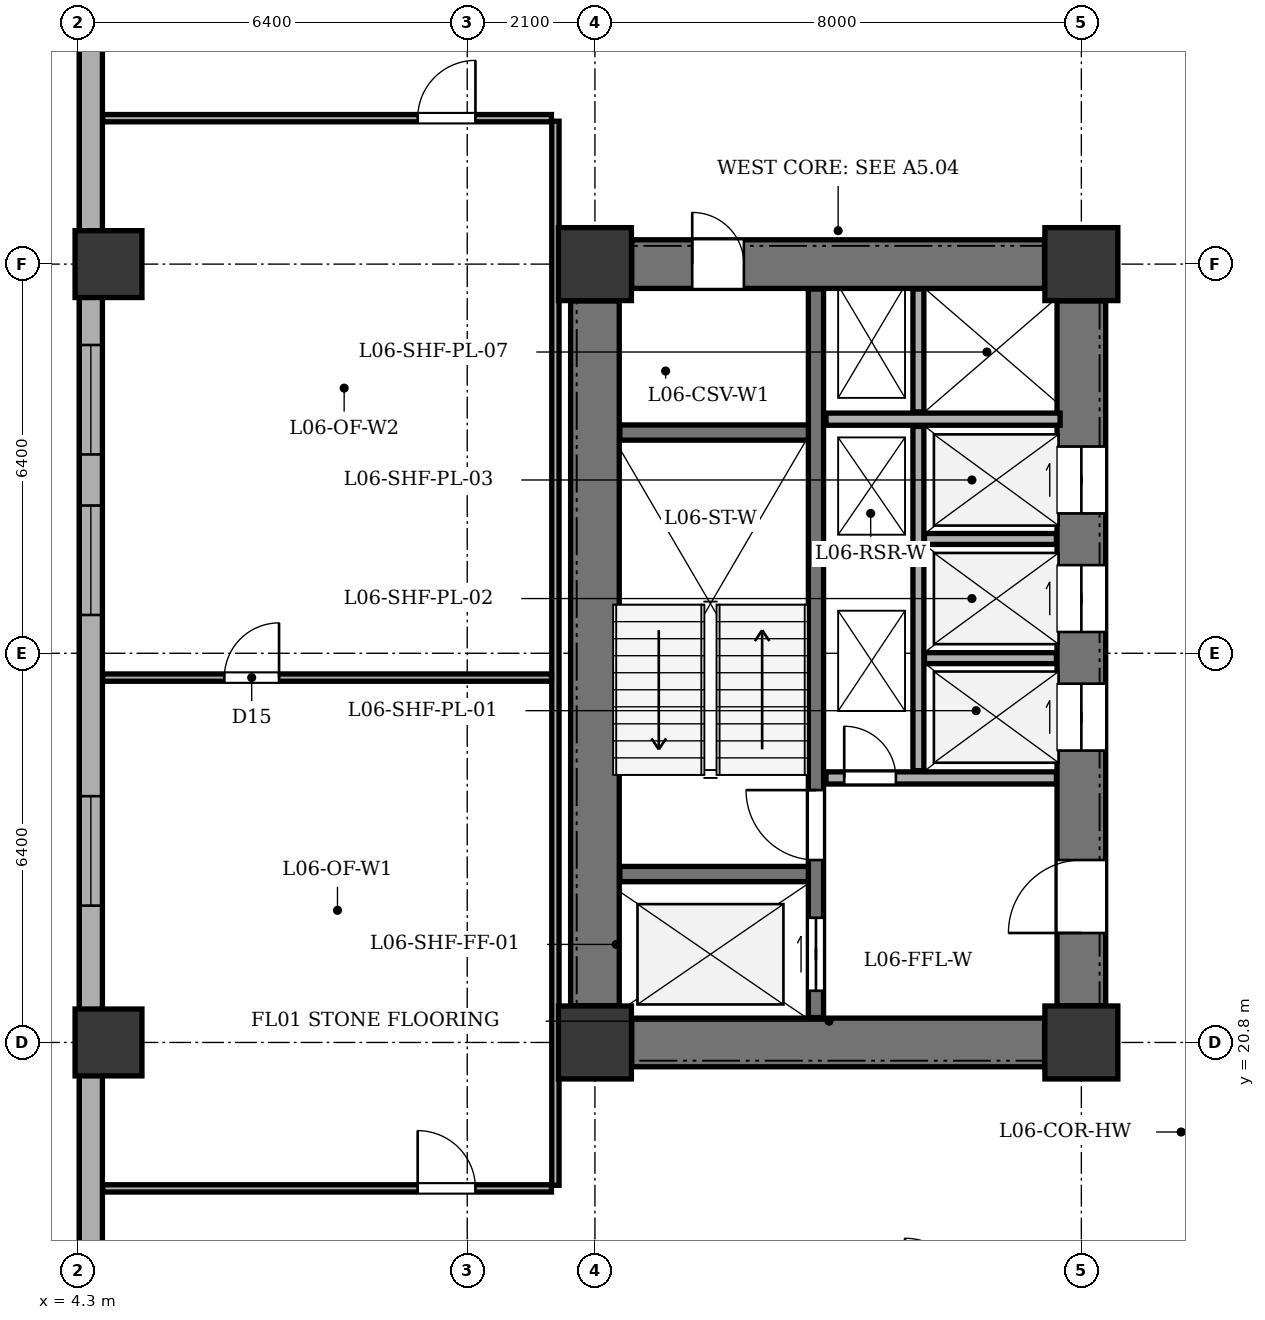
"""IFC4 building model, lengths in metres.
Left out: names, types, materials, properties, quantities, classifications, styles, units other than length and angle.
Written with IfcOpenShell. Run it as: python <this file> out.ifc"""

import sys

from ifc_helpers import new_model, si_unit, direction, frame, frame_2d, origin, origin_2d, place, context, subcontext, project, spatial, rectangle, extrude, element, fill, save


model = new_model("IFC4")
c1 = context("Model", 3, precision=1e-05, world=origin(), true_north=direction((0.0, 1.0)))
c2 = subcontext(c1, "Body", "Model", "MODEL_VIEW")
j1 = project(units=[si_unit("LENGTHUNIT", "METRE"), si_unit("PLANEANGLEUNIT", "RADIAN")], contexts=[c1])
p1 = place(None, origin())
s1 = spatial("IfcSite", under=j1, at=p1, CompositionType="ELEMENT")
p2 = place(p1, origin())
s2 = spatial("IfcBuilding", under=s1, at=p2, CompositionType="ELEMENT")
p3 = place(p2, frame((0.0, 0.0, 28.2)))
s3 = spatial("IfcBuildingStorey", under=s2, at=p3, CompositionType="ELEMENT", Elevation=28.2)
for number, where, z_axis, x_axis in (
    (1, (12.8, 20.8, 0.0), (0.0, 0.0, 1.0), (1.0, 0.0, 0.0)),
    (2, (20.8, 20.8, 0.0), (0.0, 0.0, 1.0), (1.0, 0.0, 0.0)),
    (3, (12.8, 33.6, 0.0), (0.0, 0.0, 1.0), (1.0, 0.0, 0.0)),
    (4, (20.8, 33.6, 0.0), (0.0, 0.0, 1.0), (1.0, 0.0, 0.0)),
):
    element("IfcColumn", number, at=place(p3, frame(where, z_axis=z_axis, x_axis=x_axis)), inside=s3, PredefinedType="COLUMN", context=c2, shape_type="SweptSolid", body=[
        extrude(rectangle(XDim=1.2, YDim=1.2, at=origin_2d()), origin(), (0.0, 0.0, 1.0), 3.9),
    ])
for number, where, z_axis, x_axis in (
    (5, (4.8, 20.8, 0.0), (0.0, 0.0, 1.0), (1.0, 0.0, 0.0)),
    (6, (4.8, 33.6, 0.0), (0.0, 0.0, 1.0), (1.0, 0.0, 0.0)),
):
    element("IfcColumn", number, at=place(p3, frame(where, z_axis=z_axis, x_axis=x_axis)), inside=s3, PredefinedType="COLUMN", context=c2, shape_type="SweptSolid", body=[
        extrude(rectangle(XDim=1.1, YDim=1.1, at=origin_2d()), origin(), (0.0, 0.0, 1.0), 3.9),
    ])
p4 = place(p3, frame((4.51, 6.5, 0.0), z_axis=(0.0, 0.0, 1.0), x_axis=(0.0, 1.0, 0.0)))
e7 = element("IfcWall", 7, at=p4, inside=s3, PredefinedType="STANDARD", context=c2, shape_type="SweptSolid", body=[
    extrude(rectangle(XDim=35.0, YDim=0.38, at=frame_2d((17.5, 0.0))), origin(), (0.0, 0.0, 1.0), 3.135),
])
p5 = place(p4, frame((2.693, 0.0, 0.8)))
e8 = element("IfcOpeningElement", 8, at=p5, cuts=e7, PredefinedType="OPENING", context=c2, shape_type="SweptSolid", body=[
    extrude(rectangle(XDim=1.8, YDim=1.9, at=frame_2d((0.9, 0.95))), frame((0.0, 0.2, 0.0), z_axis=(0.0, -1.0, 0.0), x_axis=(1.0, 0.0, 0.0)), (0.0, 0.0, 1.0), 0.4),
])
p6 = place(p4, frame((7.457, 0.0, 0.8)))
e9 = element("IfcOpeningElement", 9, at=p6, cuts=e7, PredefinedType="OPENING", context=c2, shape_type="SweptSolid", body=[
    extrude(rectangle(XDim=2.4, YDim=1.9, at=frame_2d((1.2, 0.95))), frame((0.0, 0.2, 0.0), z_axis=(0.0, -1.0, 0.0), x_axis=(1.0, 0.0, 0.0)), (0.0, 0.0, 1.0), 0.4),
])
p7 = place(p4, frame((16.55, 0.0, 0.8)))
e10 = element("IfcOpeningElement", 10, at=p7, cuts=e7, PredefinedType="OPENING", context=c2, shape_type="SweptSolid", body=[
    extrude(rectangle(XDim=1.8, YDim=1.9, at=frame_2d((0.9, 0.95))), frame((0.0, 0.2, 0.0), z_axis=(0.0, -1.0, 0.0), x_axis=(1.0, 0.0, 0.0)), (0.0, 0.0, 1.0), 0.4),
])
p8 = place(p4, frame((21.33, 0.0, 0.8)))
e11 = element("IfcOpeningElement", 11, at=p8, cuts=e7, PredefinedType="OPENING", context=c2, shape_type="SweptSolid", body=[
    extrude(rectangle(XDim=1.8, YDim=1.9, at=frame_2d((0.9, 0.95))), frame((0.0, 0.2, 0.0), z_axis=(0.0, -1.0, 0.0), x_axis=(1.0, 0.0, 0.0)), (0.0, 0.0, 1.0), 0.4),
])
p9 = place(p4, frame((23.97, 0.0, 0.8)))
e12 = element("IfcOpeningElement", 12, at=p9, cuts=e7, PredefinedType="OPENING", context=c2, shape_type="SweptSolid", body=[
    extrude(rectangle(XDim=1.8, YDim=1.9, at=frame_2d((0.9, 0.95))), frame((0.0, 0.2, 0.0), z_axis=(0.0, -1.0, 0.0), x_axis=(1.0, 0.0, 0.0)), (0.0, 0.0, 1.0), 0.4),
])
p10 = place(p4, frame((31.175, 0.0, 0.8)))
e13 = element("IfcOpeningElement", 13, at=p10, cuts=e7, PredefinedType="OPENING", context=c2, shape_type="SweptSolid", body=[
    extrude(rectangle(XDim=1.8, YDim=1.9, at=frame_2d((0.9, 0.95))), frame((0.0, 0.2, 0.0), z_axis=(0.0, -1.0, 0.0), x_axis=(1.0, 0.0, 0.0)), (0.0, 0.0, 1.0), 0.4),
])
p11 = place(p3, frame((12.8, 21.405, 0.0), z_axis=(0.0, 0.0, 1.0), x_axis=(0.0, 1.0, 0.0)))
e14 = element("IfcWall", 14, at=p11, inside=s3, PredefinedType="SHEAR", context=c2, shape_type="SweptSolid", body=[
    extrude(rectangle(XDim=11.59, YDim=0.8, at=frame_2d((5.795, 0.0))), origin(), (0.0, 0.0, 1.0), 3.6),
])
p12 = place(p3, frame((13.405, 20.8, 0.0), z_axis=(0.0, 0.0, 1.0), x_axis=(1.0, 0.0, 0.0)))
e15 = element("IfcWall", 15, at=p12, inside=s3, PredefinedType="SHEAR", context=c2, shape_type="SweptSolid", body=[
    extrude(rectangle(XDim=6.79, YDim=0.8, at=frame_2d((3.395, 0.0))), origin(), (0.0, 0.0, 1.0), 3.6),
])
p13 = place(p3, frame((13.405, 33.6, 0.0), z_axis=(0.0, 0.0, 1.0), x_axis=(1.0, 0.0, 0.0)))
e16 = element("IfcWall", 16, at=p13, inside=s3, PredefinedType="SHEAR", context=c2, shape_type="SweptSolid", body=[
    extrude(rectangle(XDim=6.79, YDim=0.8, at=frame_2d((3.395, 0.0))), origin(), (0.0, 0.0, 1.0), 3.6),
])
p14 = place(p13, frame((0.995, 0.0, 0.0)))
e17 = element("IfcOpeningElement", 17, at=p14, cuts=e16, PredefinedType="OPENING", context=c2, shape_type="SweptSolid", body=[
    extrude(rectangle(XDim=0.85, YDim=2.02, at=frame_2d((0.425, 1.01))), frame((0.0, 0.41, 0.0), z_axis=(0.0, -1.0, 0.0), x_axis=(1.0, 0.0, 0.0)), (0.0, 0.0, 1.0), 0.82),
])
p15 = place(p3, frame((20.8, 21.405, 0.0), z_axis=(0.0, 0.0, 1.0), x_axis=(0.0, 1.0, 0.0)))
e18 = element("IfcWall", 18, at=p15, inside=s3, PredefinedType="SHEAR", context=c2, shape_type="SweptSolid", body=[
    extrude(rectangle(XDim=11.59, YDim=0.8, at=frame_2d((5.795, 0.0))), origin(), (0.0, 0.0, 1.0), 3.6),
])
p16 = place(p15, frame((1.195, 0.0, 0.0)))
e19 = element("IfcOpeningElement", 19, at=p16, cuts=e18, PredefinedType="OPENING", context=c2, shape_type="SweptSolid", body=[
    extrude(rectangle(XDim=1.2, YDim=2.15, at=frame_2d((0.6, 1.075))), frame((0.0, 0.41, 0.0), z_axis=(0.0, -1.0, 0.0), x_axis=(1.0, 0.0, 0.0)), (0.0, 0.0, 1.0), 0.82),
])
p17 = place(p15, frame((4.195, 0.0, 0.0)))
e20 = element("IfcOpeningElement", 20, at=p17, cuts=e18, PredefinedType="OPENING", context=c2, shape_type="SweptSolid", body=[
    extrude(rectangle(XDim=1.1, YDim=2.1, at=frame_2d((0.55, 1.05))), frame((0.0, 0.41, 0.0), z_axis=(0.0, -1.0, 0.0), x_axis=(1.0, 0.0, 0.0)), (0.0, 0.0, 1.0), 0.82),
])
p18 = place(p15, frame((6.145, 0.0, 0.0)))
e21 = element("IfcOpeningElement", 21, at=p18, cuts=e18, PredefinedType="OPENING", context=c2, shape_type="SweptSolid", body=[
    extrude(rectangle(XDim=1.1, YDim=2.1, at=frame_2d((0.55, 1.05))), frame((0.0, 0.41, 0.0), z_axis=(0.0, -1.0, 0.0), x_axis=(1.0, 0.0, 0.0)), (0.0, 0.0, 1.0), 0.82),
])
p19 = place(p15, frame((8.095, 0.0, 0.0)))
e22 = element("IfcOpeningElement", 22, at=p19, cuts=e18, PredefinedType="OPENING", context=c2, shape_type="SweptSolid", body=[
    extrude(rectangle(XDim=1.1, YDim=2.1, at=frame_2d((0.55, 1.05))), frame((0.0, 0.41, 0.0), z_axis=(0.0, -1.0, 0.0), x_axis=(1.0, 0.0, 0.0)), (0.0, 0.0, 1.0), 0.82),
])
p20 = place(p3, frame((16.435, 21.21, 0.0), z_axis=(0.0, 0.0, 1.0), x_axis=(0.0, 1.0, 0.0)))
e23 = element("IfcWall", 23, at=p20, inside=s3, PredefinedType="SHEAR", context=c2, shape_type="SweptSolid", body=[
    extrude(rectangle(XDim=11.98, YDim=0.25, at=frame_2d((5.99, 0.0))), origin(), (0.0, 0.0, 1.0), 3.6),
])
p21 = place(p20, frame((0.44, 0.0, 0.0)))
e24 = element("IfcOpeningElement", 24, at=p21, cuts=e23, PredefinedType="OPENING", context=c2, shape_type="SweptSolid", body=[
    extrude(rectangle(XDim=1.2, YDim=2.15, at=frame_2d((0.6, 1.075))), frame((0.0, 0.135, 0.0), z_axis=(0.0, -1.0, 0.0), x_axis=(1.0, 0.0, 0.0)), (0.0, 0.0, 1.0), 0.27),
])
p22 = place(p20, frame((2.59, 0.0, 0.0)))
e25 = element("IfcOpeningElement", 25, at=p22, cuts=e23, PredefinedType="OPENING", context=c2, shape_type="SweptSolid", body=[
    extrude(rectangle(XDim=1.15, YDim=2.15, at=frame_2d((0.575, 1.075))), frame((0.0, 0.135, 0.0), z_axis=(0.0, -1.0, 0.0), x_axis=(1.0, 0.0, 0.0)), (0.0, 0.0, 1.0), 0.27),
])
for number, where, z_axis, x_axis in (
    (26, (13.21, 23.57, 0.0), (0.0, 0.0, 1.0), (1.0, 0.0, 0.0)),
    (27, (13.21, 30.83, 0.0), (0.0, 0.0, 1.0), (1.0, 0.0, 0.0)),
):
    element("IfcWall", number, at=place(p3, frame(where, z_axis=z_axis, x_axis=x_axis)), inside=s3, PredefinedType="SHEAR", context=c2, shape_type="SweptSolid", body=[
        extrude(rectangle(XDim=3.1, YDim=0.25, at=frame_2d((1.55, 0.0))), origin(), (0.0, 0.0, 1.0), 3.6),
    ])
p23 = place(p3, frame((16.6, 25.15, 0.0), z_axis=(0.0, 0.0, 1.0), x_axis=(1.0, 0.0, 0.0)))
e28 = element("IfcWall", 28, at=p23, inside=s3, PredefinedType="SOLIDWALL", context=c2, shape_type="SweptSolid", body=[
    extrude(rectangle(XDim=3.79, YDim=0.2, at=frame_2d((1.895, 0.0))), origin(), (0.0, 0.0, 1.0), 3.6),
])
p24 = place(p23, frame((0.3, 0.0, 0.0)))
e29 = element("IfcOpeningElement", 29, at=p24, cuts=e28, PredefinedType="OPENING", context=c2, shape_type="SweptSolid", body=[
    extrude(rectangle(XDim=0.85, YDim=2.02, at=frame_2d((0.425, 1.01))), frame((0.0, 0.11, 0.0), z_axis=(0.0, -1.0, 0.0), x_axis=(1.0, 0.0, 0.0)), (0.0, 0.0, 1.0), 0.22),
])
p25 = place(p3, frame((16.6, 31.05, 0.0), z_axis=(0.0, 0.0, 1.0), x_axis=(1.0, 0.0, 0.0)))
e30 = element("IfcWall", 30, at=p25, inside=s3, PredefinedType="SOLIDWALL", context=c2, shape_type="SweptSolid", body=[
    extrude(rectangle(XDim=3.85, YDim=0.2, at=frame_2d((1.925, 0.0))), origin(), (0.0, 0.0, 1.0), 3.6),
])
p26 = place(p3, frame((18.12, 25.27, 0.0), z_axis=(0.0, 0.0, 1.0), x_axis=(0.0, 1.0, 0.0)))
e31 = element("IfcWall", 31, at=p26, inside=s3, PredefinedType="PARTITIONING", context=c2, shape_type="SweptSolid", body=[
    extrude(rectangle(XDim=5.66, YDim=0.18, at=frame_2d((2.83, 0.0))), origin(), (0.0, 0.0, 1.0), 3.6),
])
p27 = place(p3, frame((18.12, 31.17, 0.0), z_axis=(0.0, 0.0, 1.0), x_axis=(0.0, 1.0, 0.0)))
e32 = element("IfcWall", 32, at=p27, inside=s3, PredefinedType="PARTITIONING", context=c2, shape_type="SweptSolid", body=[
    extrude(rectangle(XDim=2.02, YDim=0.18, at=frame_2d((1.01, 0.0))), origin(), (0.0, 0.0, 1.0), 3.6),
])
for number, where, z_axis, x_axis in (
    (33, (18.22, 27.12, 0.0), (0.0, 0.0, 1.0), (1.0, 0.0, 0.0)),
    (34, (18.22, 29.08, 0.0), (0.0, 0.0, 1.0), (1.0, 0.0, 0.0)),
):
    element("IfcWall", number, at=place(p3, frame(where, z_axis=z_axis, x_axis=x_axis)), inside=s3, PredefinedType="PARTITIONING", context=c2, shape_type="SweptSolid", body=[
        extrude(rectangle(XDim=2.17, YDim=0.18, at=frame_2d((1.085, 0.0))), origin(), (0.0, 0.0, 1.0), 3.6),
    ])
p28 = place(p3, frame((12.15, 18.45, 0.0), z_axis=(0.0, 0.0, 1.0), x_axis=(0.0, 1.0, 0.0)))
e35 = element("IfcWall", 35, at=p28, inside=s3, PredefinedType="PARTITIONING", context=c2, shape_type="SweptSolid", body=[
    extrude(rectangle(XDim=17.5, YDim=0.12, at=frame_2d((8.75, 0.0))), origin(), (0.0, 0.0, 1.0), 3.6),
])
p29 = place(p3, frame((4.705, 18.4, 0.0), z_axis=(0.0, 0.0, 1.0), x_axis=(1.0, 0.0, 0.0)))
e36 = element("IfcWall", 36, at=p29, inside=s3, PredefinedType="PARTITIONING", context=c2, shape_type="SweptSolid", body=[
    extrude(rectangle(XDim=7.38, YDim=0.12, at=frame_2d((3.69, 0.0))), origin(), (0.0, 0.0, 1.0), 3.6),
])
p30 = place(p29, frame((5.18, 0.0, 0.0)))
e37 = element("IfcOpeningElement", 37, at=p30, cuts=e36, PredefinedType="OPENING", context=c2, shape_type="SweptSolid", body=[
    extrude(rectangle(XDim=0.95, YDim=2.1, at=frame_2d((0.475, 1.05))), frame((0.0, 0.07, 0.0), z_axis=(0.0, -1.0, 0.0), x_axis=(1.0, 0.0, 0.0)), (0.0, 0.0, 1.0), 0.14),
])
p31 = place(p3, frame((4.705, 36.0, 0.0), z_axis=(0.0, 0.0, 1.0), x_axis=(1.0, 0.0, 0.0)))
e38 = element("IfcWall", 38, at=p31, inside=s3, PredefinedType="PARTITIONING", context=c2, shape_type="SweptSolid", body=[
    extrude(rectangle(XDim=7.38, YDim=0.12, at=frame_2d((3.69, 0.0))), origin(), (0.0, 0.0, 1.0), 3.6),
])
p32 = place(p31, frame((5.18, 0.0, 0.0)))
e39 = element("IfcOpeningElement", 39, at=p32, cuts=e38, PredefinedType="OPENING", context=c2, shape_type="SweptSolid", body=[
    extrude(rectangle(XDim=0.95, YDim=2.1, at=frame_2d((0.475, 1.05))), frame((0.0, 0.07, 0.0), z_axis=(0.0, -1.0, 0.0), x_axis=(1.0, 0.0, 0.0)), (0.0, 0.0, 1.0), 0.14),
])
p33 = place(p3, frame((4.705, 26.8, 0.0), z_axis=(0.0, 0.0, 1.0), x_axis=(1.0, 0.0, 0.0)))
e40 = element("IfcWall", 40, at=p33, inside=s3, PredefinedType="PARTITIONING", context=c2, shape_type="SweptSolid", body=[
    extrude(rectangle(XDim=7.38, YDim=0.12, at=frame_2d((3.69, 0.0))), origin(), (0.0, 0.0, 1.0), 3.6),
])
p34 = place(p33, frame((2.0, 0.0, 0.0)))
e41 = element("IfcOpeningElement", 41, at=p34, cuts=e40, PredefinedType="OPENING", context=c2, shape_type="SweptSolid", body=[
    extrude(rectangle(XDim=0.9, YDim=2.05, at=frame_2d((0.45, 1.025))), frame((0.0, 0.07, 0.0), z_axis=(0.0, -1.0, 0.0), x_axis=(1.0, 0.0, 0.0)), (0.0, 0.0, 1.0), 0.14),
])
p35 = place(p7, origin())
e42 = element("IfcWindow", 42, at=p35, inside=s3, PartitioningType="SINGLE_PANEL", PredefinedType="WINDOW", context=c2, shape_type="SweptSolid", body=[
    extrude(rectangle(XDim=1.8, YDim=1.9, at=frame_2d((0.9, 0.95))), frame((0.0, -0.01, 0.0), z_axis=(0.0, -1.0, 0.0), x_axis=(1.0, 0.0, 0.0)), (0.0, 0.0, 1.0), 0.06),
])
fill(e10, e42)
p36 = place(p8, origin())
e43 = element("IfcWindow", 43, at=p36, inside=s3, PartitioningType="SINGLE_PANEL", PredefinedType="WINDOW", context=c2, shape_type="SweptSolid", body=[
    extrude(rectangle(XDim=1.8, YDim=1.9, at=frame_2d((0.9, 0.95))), frame((0.0, -0.01, 0.0), z_axis=(0.0, -1.0, 0.0), x_axis=(1.0, 0.0, 0.0)), (0.0, 0.0, 1.0), 0.06),
])
fill(e11, e43)
p37 = place(p9, origin())
e44 = element("IfcWindow", 44, at=p37, inside=s3, PartitioningType="SINGLE_PANEL", PredefinedType="WINDOW", context=c2, shape_type="SweptSolid", body=[
    extrude(rectangle(XDim=1.8, YDim=1.9, at=frame_2d((0.9, 0.95))), frame((0.0, -0.01, 0.0), z_axis=(0.0, -1.0, 0.0), x_axis=(1.0, 0.0, 0.0)), (0.0, 0.0, 1.0), 0.06),
])
fill(e12, e44)
p38 = place(p14, origin())
e45 = element("IfcDoor", 45, at=p38, inside=s3, OperationType="SINGLE_SWING_LEFT", PredefinedType="DOOR", context=c2, shape_type="SweptSolid", body=[
    extrude(rectangle(XDim=0.85, YDim=2.02, at=frame_2d((0.425, 1.01))), frame((0.0, 0.025, 0.0), z_axis=(0.0, -1.0, 0.0), x_axis=(1.0, 0.0, 0.0)), (0.0, 0.0, 1.0), 0.05),
])
fill(e17, e45)
p39 = place(p16, origin())
e46 = element("IfcDoor", 46, at=p39, inside=s3, OperationType="SINGLE_SWING_LEFT", PredefinedType="DOOR", context=c2, shape_type="SweptSolid", body=[
    extrude(rectangle(XDim=1.2, YDim=2.15, at=frame_2d((0.6, 1.075))), frame((0.0, 0.025, 0.0), z_axis=(0.0, -1.0, 0.0), x_axis=(1.0, 0.0, 0.0)), (0.0, 0.0, 1.0), 0.05),
])
fill(e19, e46)
p40 = place(p17, origin())
e47 = element("IfcDoor", 47, at=p40, inside=s3, OperationType="DOUBLE_DOOR_SLIDING", PredefinedType="DOOR", context=c2, shape_type="SweptSolid", body=[
    extrude(rectangle(XDim=1.1, YDim=2.1, at=frame_2d((0.55, 1.05))), frame((0.0, 0.025, 0.0), z_axis=(0.0, -1.0, 0.0), x_axis=(1.0, 0.0, 0.0)), (0.0, 0.0, 1.0), 0.05),
])
fill(e20, e47)
p41 = place(p18, origin())
e48 = element("IfcDoor", 48, at=p41, inside=s3, OperationType="DOUBLE_DOOR_SLIDING", PredefinedType="DOOR", context=c2, shape_type="SweptSolid", body=[
    extrude(rectangle(XDim=1.1, YDim=2.1, at=frame_2d((0.55, 1.05))), frame((0.0, 0.025, 0.0), z_axis=(0.0, -1.0, 0.0), x_axis=(1.0, 0.0, 0.0)), (0.0, 0.0, 1.0), 0.05),
])
fill(e21, e48)
p42 = place(p19, origin())
e49 = element("IfcDoor", 49, at=p42, inside=s3, OperationType="DOUBLE_DOOR_SLIDING", PredefinedType="DOOR", context=c2, shape_type="SweptSolid", body=[
    extrude(rectangle(XDim=1.1, YDim=2.1, at=frame_2d((0.55, 1.05))), frame((0.0, 0.025, 0.0), z_axis=(0.0, -1.0, 0.0), x_axis=(1.0, 0.0, 0.0)), (0.0, 0.0, 1.0), 0.05),
])
fill(e22, e49)
p43 = place(p21, origin())
e50 = element("IfcDoor", 50, at=p43, inside=s3, OperationType="DOUBLE_DOOR_SLIDING", PredefinedType="DOOR", context=c2, shape_type="SweptSolid", body=[
    extrude(rectangle(XDim=1.2, YDim=2.15, at=frame_2d((0.6, 1.075))), frame((0.0, 0.025, 0.0), z_axis=(0.0, -1.0, 0.0), x_axis=(1.0, 0.0, 0.0)), (0.0, 0.0, 1.0), 0.05),
])
fill(e24, e50)
p44 = place(p22, origin())
e51 = element("IfcDoor", 51, at=p44, inside=s3, OperationType="SINGLE_SWING_RIGHT", PredefinedType="DOOR", context=c2, shape_type="SweptSolid", body=[
    extrude(rectangle(XDim=1.15, YDim=2.15, at=frame_2d((0.575, 1.075))), frame((0.0, 0.025, 0.0), z_axis=(0.0, -1.0, 0.0), x_axis=(1.0, 0.0, 0.0)), (0.0, 0.0, 1.0), 0.05),
])
fill(e25, e51)
p45 = place(p24, origin())
e52 = element("IfcDoor", 52, at=p45, inside=s3, OperationType="SINGLE_SWING_LEFT", PredefinedType="DOOR", context=c2, shape_type="SweptSolid", body=[
    extrude(rectangle(XDim=0.85, YDim=2.02, at=frame_2d((0.425, 1.01))), frame((0.0, 0.025, 0.0), z_axis=(0.0, -1.0, 0.0), x_axis=(1.0, 0.0, 0.0)), (0.0, 0.0, 1.0), 0.05),
])
fill(e29, e52)
p46 = place(p34, origin())
e53 = element("IfcDoor", 53, at=p46, inside=s3, OperationType="SINGLE_SWING_RIGHT", PredefinedType="DOOR", context=c2, shape_type="SweptSolid", body=[
    extrude(rectangle(XDim=0.9, YDim=2.05, at=frame_2d((0.45, 1.025))), frame((0.0, 0.025, 0.0), z_axis=(0.0, -1.0, 0.0), x_axis=(1.0, 0.0, 0.0)), (0.0, 0.0, 1.0), 0.05),
])
fill(e41, e53)
p47 = place(p30, origin())
e54 = element("IfcDoor", 54, at=p47, inside=s3, OperationType="SINGLE_SWING_LEFT", PredefinedType="DOOR", context=c2, shape_type="SweptSolid", body=[
    extrude(rectangle(XDim=0.95, YDim=2.1, at=frame_2d((0.475, 1.05))), frame((0.0, 0.025, 0.0), z_axis=(0.0, -1.0, 0.0), x_axis=(1.0, 0.0, 0.0)), (0.0, 0.0, 1.0), 0.05),
])
fill(e37, e54)
p48 = place(p32, origin())
e55 = element("IfcDoor", 55, at=p48, inside=s3, OperationType="SINGLE_SWING_RIGHT", PredefinedType="DOOR", context=c2, shape_type="SweptSolid", body=[
    extrude(rectangle(XDim=0.95, YDim=2.1, at=frame_2d((0.475, 1.05))), frame((0.0, 0.025, 0.0), z_axis=(0.0, -1.0, 0.0), x_axis=(1.0, 0.0, 0.0)), (0.0, 0.0, 1.0), 0.05),
])
fill(e39, e55)
save(model, sys.argv[1])
